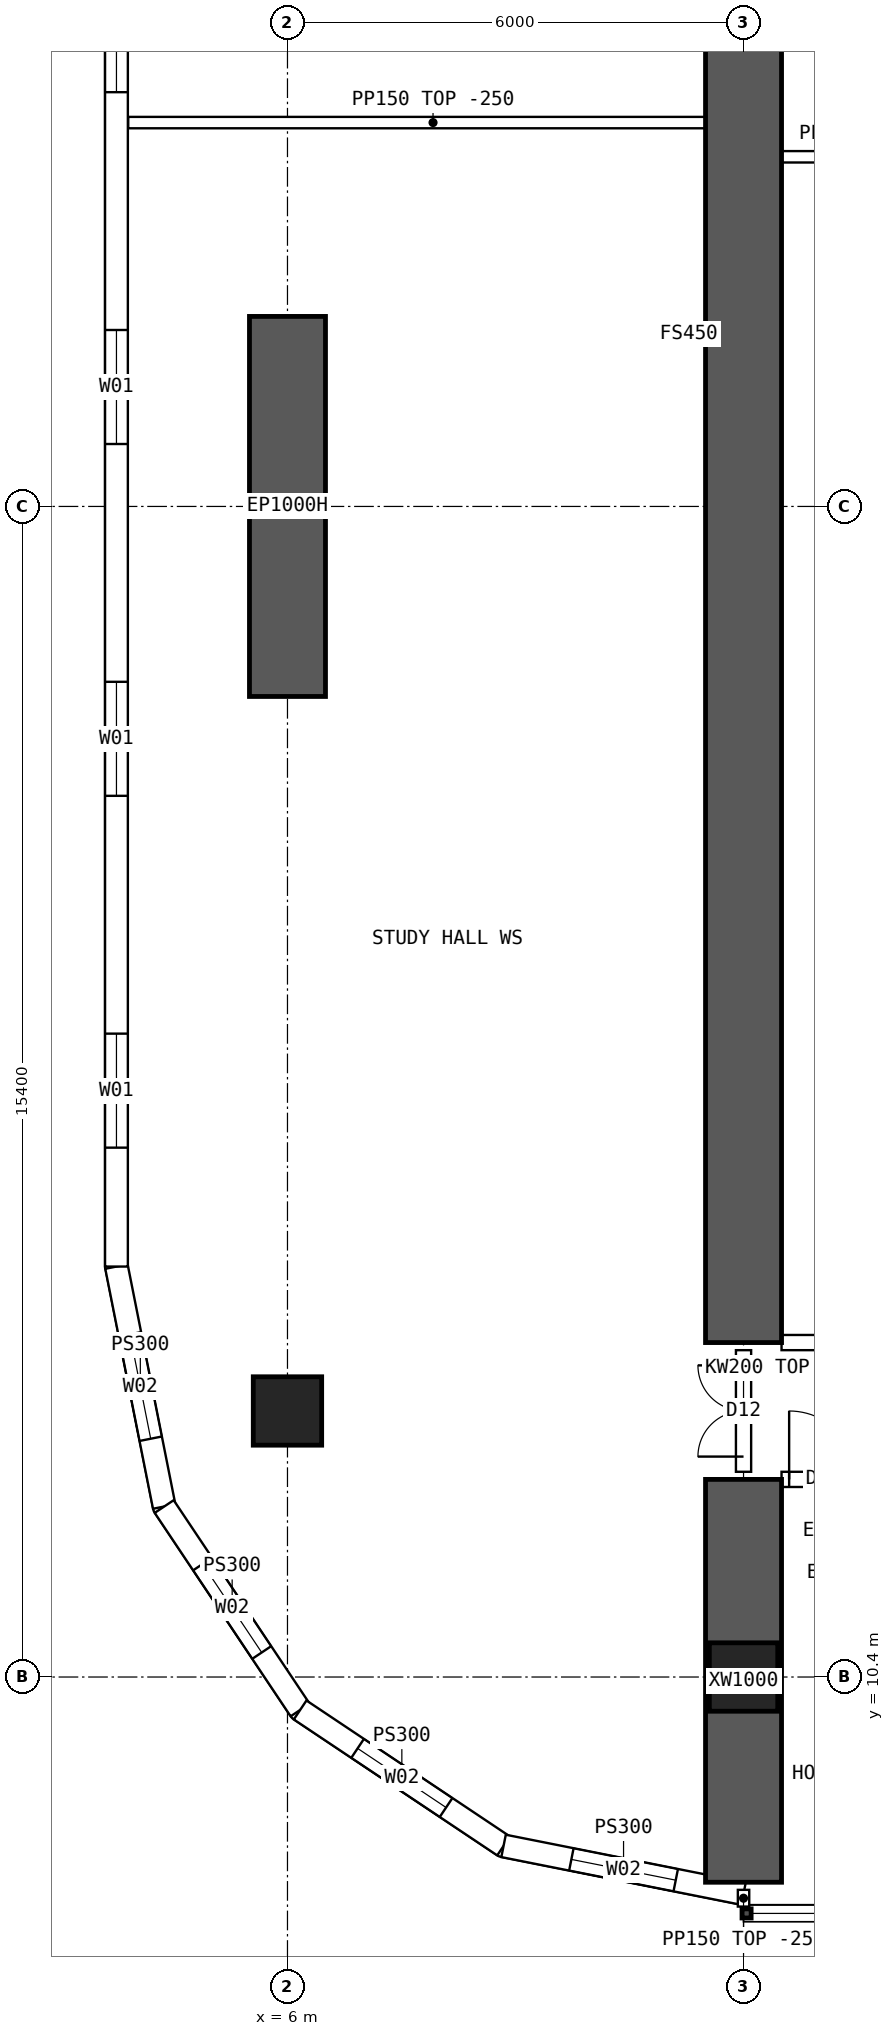
"""IFC4 building model, lengths in metres.
Left out: names, types, materials, properties, quantities, classifications, styles, units other than length and angle.
Written with IfcOpenShell. Run it as: python <this file> out.ifc"""

import sys

from ifc_helpers import new_model, si_unit, direction, frame, frame_2d, origin, origin_2d, place, context, subcontext, project, spatial, polyline, rectangle, hollow_rectangle, outline, extrude, element, fill, save


model = new_model("IFC4")
c1 = context("Model", 3, precision=1e-05, world=origin(), true_north=direction((0.0, 1.0)))
c2 = subcontext(c1, "Body", "Model", "MODEL_VIEW")
j1 = project(units=[si_unit("LENGTHUNIT", "METRE"), si_unit("PLANEANGLEUNIT", "RADIAN")], contexts=[c1])
p1 = place(None, origin())
s1 = spatial("IfcSite", under=j1, at=p1, CompositionType="ELEMENT")
p2 = place(p1, origin())
s2 = spatial("IfcBuilding", under=s1, at=p2, CompositionType="ELEMENT")
p3 = place(p2, frame((0.0, 0.0, 38.95)))
s3 = spatial("IfcBuildingStorey", under=s2, at=p3, CompositionType="ELEMENT", Elevation=38.95)
for number, where, z_axis, x_axis in (
    (1, (12.0, 10.4, 0.0), (0.0, 0.0, 1.0), (1.0, 0.0, 0.0)),
    (2, (6.0, 13.9, 0.0), (0.0, 0.0, 1.0), (1.0, 0.0, 0.0)),
):
    element("IfcColumn", number, at=place(p3, frame(where, z_axis=z_axis, x_axis=x_axis)), inside=s3, PredefinedType="COLUMN", context=c2, shape_type="SweptSolid", body=[
        extrude(hollow_rectangle(XDim=0.9, YDim=0.9, WallThickness=0.09, at=origin_2d()), origin(), (0.0, 0.0, 1.0), 3.75),
    ])
p4 = place(p3, frame((6.0, 23.3, 0.0), z_axis=(0.0, 0.0, 1.0), x_axis=(0.0, 1.0, 0.0)))
e3 = element("IfcWall", 3, at=p4, inside=s3, PredefinedType="SHEAR", context=c2, shape_type="SweptSolid", body=[
    extrude(rectangle(XDim=5.0, YDim=1.0, at=frame_2d((2.5, 0.0))), origin(), (0.0, 0.0, 1.0), 3.75),
])
p5 = place(p3, frame((12.0, 7.7, 0.0), z_axis=(0.0, 0.0, 1.0), x_axis=(0.0, 1.0, 0.0)))
e4 = element("IfcWall", 4, at=p5, inside=s3, PredefinedType="SHEAR", context=c2, shape_type="SweptSolid", body=[
    extrude(rectangle(XDim=5.3, YDim=1.0, at=frame_2d((2.65, 0.0))), origin(), (0.0, 0.0, 1.0), 3.75),
])
p6 = place(p3, frame((12.0, 14.8, 0.0), z_axis=(0.0, 0.0, 1.0), x_axis=(0.0, 1.0, 0.0)))
e5 = element("IfcWall", 5, at=p6, inside=s3, PredefinedType="SHEAR", context=c2, shape_type="SweptSolid", body=[
    extrude(rectangle(XDim=34.4, YDim=1.0, at=frame_2d((17.2, 0.0))), origin(), (0.0, 0.0, 1.0), 3.75),
])
p7 = place(p3, frame((3.75, 48.2, 0.0), z_axis=(0.0, 0.0, 1.0), x_axis=(0.0, -1.0, 0.0)))
e6 = element("IfcWall", 6, at=p7, inside=s3, PredefinedType="SOLIDWALL", context=c2, shape_type="SweptSolid", body=[
    extrude(outline(polyline([(-0.015, -0.15), (32.415, -0.15), (32.385, 0.15), (0.015, 0.15), (-0.015, -0.15)])), origin(), (0.0, 0.0, 1.0), 3.5),
])
p8 = place(p7, frame((1.564, 0.0, 0.9)))
e7 = element("IfcOpeningElement", 7, at=p8, cuts=e6, PredefinedType="OPENING", context=c2, shape_type="SweptSolid", body=[
    extrude(rectangle(XDim=1.5, YDim=2.0, at=frame_2d((0.75, 1.0))), frame((0.0, 0.16, 0.0), z_axis=(0.0, -1.0, 0.0), x_axis=(1.0, 0.0, 0.0)), (0.0, 0.0, 1.0), 0.32),
])
p9 = place(p7, frame((6.193, 0.0, 0.9)))
e8 = element("IfcOpeningElement", 8, at=p9, cuts=e6, PredefinedType="OPENING", context=c2, shape_type="SweptSolid", body=[
    extrude(rectangle(XDim=1.5, YDim=2.0, at=frame_2d((0.75, 1.0))), frame((0.0, 0.16, 0.0), z_axis=(0.0, -1.0, 0.0), x_axis=(1.0, 0.0, 0.0)), (0.0, 0.0, 1.0), 0.32),
])
p10 = place(p7, frame((10.822, 0.0, 0.9)))
e9 = element("IfcOpeningElement", 9, at=p10, cuts=e6, PredefinedType="OPENING", context=c2, shape_type="SweptSolid", body=[
    extrude(rectangle(XDim=1.5, YDim=2.0, at=frame_2d((0.75, 1.0))), frame((0.0, 0.16, 0.0), z_axis=(0.0, -1.0, 0.0), x_axis=(1.0, 0.0, 0.0)), (0.0, 0.0, 1.0), 0.32),
])
p11 = place(p7, frame((15.45, 0.0, 0.9)))
e10 = element("IfcOpeningElement", 10, at=p11, cuts=e6, PredefinedType="OPENING", context=c2, shape_type="SweptSolid", body=[
    extrude(rectangle(XDim=1.5, YDim=2.0, at=frame_2d((0.75, 1.0))), frame((0.0, 0.16, 0.0), z_axis=(0.0, -1.0, 0.0), x_axis=(1.0, 0.0, 0.0)), (0.0, 0.0, 1.0), 0.32),
])
p12 = place(p7, frame((20.079, 0.0, 0.9)))
e11 = element("IfcOpeningElement", 11, at=p12, cuts=e6, PredefinedType="OPENING", context=c2, shape_type="SweptSolid", body=[
    extrude(rectangle(XDim=1.5, YDim=2.0, at=frame_2d((0.75, 1.0))), frame((0.0, 0.16, 0.0), z_axis=(0.0, -1.0, 0.0), x_axis=(1.0, 0.0, 0.0)), (0.0, 0.0, 1.0), 0.32),
])
p13 = place(p7, frame((24.707, 0.0, 0.9)))
e12 = element("IfcOpeningElement", 12, at=p13, cuts=e6, PredefinedType="OPENING", context=c2, shape_type="SweptSolid", body=[
    extrude(rectangle(XDim=1.5, YDim=2.0, at=frame_2d((0.75, 1.0))), frame((0.0, 0.16, 0.0), z_axis=(0.0, -1.0, 0.0), x_axis=(1.0, 0.0, 0.0)), (0.0, 0.0, 1.0), 0.32),
])
p14 = place(p7, frame((29.336, 0.0, 0.9)))
e13 = element("IfcOpeningElement", 13, at=p14, cuts=e6, PredefinedType="OPENING", context=c2, shape_type="SweptSolid", body=[
    extrude(rectangle(XDim=1.5, YDim=2.0, at=frame_2d((0.75, 1.0))), frame((0.0, 0.16, 0.0), z_axis=(0.0, -1.0, 0.0), x_axis=(1.0, 0.0, 0.0)), (0.0, 0.0, 1.0), 0.32),
])
p15 = place(p3, frame((3.75, 15.8, 0.0), z_axis=(0.0, 0.0, 1.0), x_axis=(0.195065901187, -0.980790137692, 0.0)))
e14 = element("IfcWall", 14, at=p15, inside=s3, PredefinedType="SOLIDWALL", context=c2, shape_type="SweptSolid", body=[
    extrude(outline(polyline([(-0.015, -0.15), (3.249, -0.15), (3.189, 0.15), (0.015, 0.15), (-0.015, -0.15)])), origin(), (0.0, 0.0, 1.0), 3.5),
])
p16 = place(p15, frame((0.909, 0.0, 0.9)))
e15 = element("IfcOpeningElement", 15, at=p16, cuts=e14, PredefinedType="OPENING", context=c2, shape_type="SweptSolid", body=[
    extrude(rectangle(XDim=1.4, YDim=1.8, at=frame_2d((0.7, 0.9))), frame((0.0, 0.16, 0.0), z_axis=(0.0, -1.0, 0.0), x_axis=(1.0, 0.0, 0.0)), (0.0, 0.0, 1.0), 0.32),
])
p17 = place(p3, frame((4.378, 12.643, 0.0), z_axis=(0.0, 0.0, 1.0), x_axis=(0.555609954424, -0.831443069936, 0.0)))
e16 = element("IfcWall", 16, at=p17, inside=s3, PredefinedType="SOLIDWALL", context=c2, shape_type="SweptSolid", body=[
    extrude(outline(polyline([(-0.03, -0.15), (3.249, -0.15), (3.189, 0.15), (0.03, 0.15), (-0.03, -0.15)])), origin(), (0.0, 0.0, 1.0), 3.5),
])
p18 = place(p17, frame((0.909, 0.0, 0.9)))
e17 = element("IfcOpeningElement", 17, at=p18, cuts=e16, PredefinedType="OPENING", context=c2, shape_type="SweptSolid", body=[
    extrude(rectangle(XDim=1.4, YDim=1.8, at=frame_2d((0.7, 0.9))), frame((0.0, 0.16, 0.0), z_axis=(0.0, -1.0, 0.0), x_axis=(1.0, 0.0, 0.0)), (0.0, 0.0, 1.0), 0.32),
])
p19 = place(p3, frame((6.167, 9.966, 0.0), z_axis=(0.0, 0.0, 1.0), x_axis=(0.831478105043, -0.555557522525, 0.0)))
e18 = element("IfcWall", 18, at=p19, inside=s3, PredefinedType="SOLIDWALL", context=c2, shape_type="SweptSolid", body=[
    extrude(outline(polyline([(-0.03, -0.15), (3.249, -0.15), (3.189, 0.15), (0.03, 0.15), (-0.03, -0.15)])), origin(), (0.0, 0.0, 1.0), 3.5),
])
p20 = place(p19, frame((0.909, 0.0, 0.9)))
e19 = element("IfcOpeningElement", 19, at=p20, cuts=e18, PredefinedType="OPENING", context=c2, shape_type="SweptSolid", body=[
    extrude(rectangle(XDim=1.4, YDim=1.8, at=frame_2d((0.7, 0.9))), frame((0.0, 0.16, 0.0), z_axis=(0.0, -1.0, 0.0), x_axis=(1.0, 0.0, 0.0)), (0.0, 0.0, 1.0), 0.32),
])
p21 = place(p3, frame((8.843, 8.178, 0.0), z_axis=(0.0, 0.0, 1.0), x_axis=(0.980787251524, -0.195080412259, 0.0)))
e20 = element("IfcWall", 20, at=p21, inside=s3, PredefinedType="SOLIDWALL", context=c2, shape_type="SweptSolid", body=[
    extrude(outline(polyline([(-0.03, -0.15), (3.249, -0.15), (3.189, 0.15), (0.03, 0.15), (-0.03, -0.15)])), origin(), (0.0, 0.0, 1.0), 3.5),
])
p22 = place(p21, frame((0.909, 0.0, 0.9)))
e21 = element("IfcOpeningElement", 21, at=p22, cuts=e20, PredefinedType="OPENING", context=c2, shape_type="SweptSolid", body=[
    extrude(rectangle(XDim=1.4, YDim=1.8, at=frame_2d((0.7, 0.9))), frame((0.0, 0.16, 0.0), z_axis=(0.0, -1.0, 0.0), x_axis=(1.0, 0.0, 0.0)), (0.0, 0.0, 1.0), 0.32),
])
p23 = place(p3, frame((12.5, 13.0, 0.0), z_axis=(0.0, 0.0, 1.0), x_axis=(1.0, 0.0, 0.0)))
e22 = element("IfcWall", 22, at=p23, inside=s3, PredefinedType="SOLIDWALL", context=c2, shape_type="SweptSolid", body=[
    extrude(outline(polyline([(0.0, 0.0), (5.0, 0.0), (5.0, 3.1), (0.0, 3.1), (0.0, 0.0)])), frame((0.0, 0.1, 0.0), z_axis=(0.0, -1.0, 0.0), x_axis=(1.0, 0.0, 0.0)), (0.0, 0.0, 1.0), 0.2),
])
p24 = place(p23, frame((0.1, 0.0, 0.0)))
e23 = element("IfcOpeningElement", 23, at=p24, cuts=e22, PredefinedType="OPENING", context=c2, shape_type="SweptSolid", body=[
    extrude(rectangle(XDim=0.9, YDim=2.1, at=frame_2d((0.45, 1.05))), frame((0.0, 0.11, 0.0), z_axis=(0.0, -1.0, 0.0), x_axis=(1.0, 0.0, 0.0)), (0.0, 0.0, 1.0), 0.22),
])
p25 = place(p23, frame((4.0, 0.0, 0.0)))
e24 = element("IfcOpeningElement", 24, at=p25, cuts=e22, PredefinedType="OPENING", context=c2, shape_type="SweptSolid", body=[
    extrude(rectangle(XDim=0.9, YDim=2.1, at=frame_2d((0.45, 1.05))), frame((0.0, 0.11, 0.0), z_axis=(0.0, -1.0, 0.0), x_axis=(1.0, 0.0, 0.0)), (0.0, 0.0, 1.0), 0.22),
])
p26 = place(p3, frame((12.5, 14.8, 0.0), z_axis=(0.0, 0.0, 1.0), x_axis=(1.0, 0.0, 0.0)))
e25 = element("IfcWall", 25, at=p26, inside=s3, PredefinedType="SOLIDWALL", context=c2, shape_type="SweptSolid", body=[
    extrude(rectangle(XDim=5.0, YDim=0.2, at=frame_2d((2.5, 0.0))), origin(), (0.0, 0.0, 1.0), 3.5),
])
p27 = place(p26, frame((3.3, 0.0, 0.0)))
e26 = element("IfcOpeningElement", 26, at=p27, cuts=e25, PredefinedType="OPENING", context=c2, shape_type="SweptSolid", body=[
    extrude(rectangle(XDim=1.6, YDim=2.1, at=frame_2d((0.8, 1.05))), frame((0.0, 0.11, 0.0), z_axis=(0.0, -1.0, 0.0), x_axis=(1.0, 0.0, 0.0)), (0.0, 0.0, 1.0), 0.22),
])
p28 = place(p3, frame((12.0, 30.4, 0.0), z_axis=(0.0, 0.0, 1.0), x_axis=(1.0, 0.0, 0.0)))
e27 = element("IfcWall", 27, at=p28, inside=s3, PredefinedType="PARTITIONING", context=c2, shape_type="SweptSolid", body=[
    extrude(rectangle(XDim=3.6, YDim=0.15, at=frame_2d((1.8, 0.0))), origin(), (0.0, 0.0, 1.0), 3.5),
])
p29 = place(p3, frame((3.905, 30.85, 0.0), z_axis=(0.0, 0.0, 1.0), x_axis=(1.0, 0.0, 0.0)))
e28 = element("IfcWall", 28, at=p29, inside=s3, PredefinedType="PARTITIONING", context=c2, shape_type="SweptSolid", body=[
    extrude(outline(polyline([(0.0, 0.0), (8.02, 0.0), (8.02, 3.5), (2.397, 3.5), (2.395, 3.05), (1.797, 3.05), (1.795, 3.5), (0.0, 3.5), (0.0, 0.0)])), frame((0.0, 0.075, 0.0), z_axis=(0.0, -1.0, 0.0), x_axis=(1.0, 0.0, 0.0)), (0.0, 0.0, 1.0), 0.15),
])
p30 = place(p3, frame((12.0, 13.1, 0.0), z_axis=(0.0, 0.0, 1.0), x_axis=(0.0, 1.0, 0.0)))
e29 = element("IfcWall", 29, at=p30, inside=s3, PredefinedType="SOLIDWALL", context=c2, shape_type="SweptSolid", body=[
    extrude(outline(polyline([(0.0, 0.0), (1.6, 0.0), (1.6, 3.05), (0.0, 3.05), (0.0, 0.0)])), frame((0.0, 0.1, 0.0), z_axis=(0.0, -1.0, 0.0), x_axis=(1.0, 0.0, 0.0)), (0.0, 0.0, 1.0), 0.2),
])
p31 = place(p30, frame((0.2, 0.0, 0.0)))
e30 = element("IfcOpeningElement", 30, at=p31, cuts=e29, PredefinedType="OPENING", context=c2, shape_type="SweptSolid", body=[
    extrude(rectangle(XDim=1.2, YDim=2.1, at=frame_2d((0.6, 1.05))), frame((0.0, 0.11, 0.0), z_axis=(0.0, -1.0, 0.0), x_axis=(1.0, 0.0, 0.0)), (0.0, 0.0, 1.0), 0.22),
])
p32 = place(p3, frame((12.0, 7.6, 0.0), z_axis=(0.0, 0.0, 1.0), x_axis=(0.0, -1.0, 0.0)))
e31 = element("IfcWall", 31, at=p32, inside=s3, PredefinedType="PARTITIONING", context=c2, shape_type="SweptSolid", body=[
    extrude(rectangle(XDim=0.22, YDim=0.15, at=frame_2d((0.11, 0.0))), origin(), (0.0, 0.0, 1.0), 3.5),
])
p33 = place(p11, origin())
e32 = element("IfcWindow", 32, at=p33, inside=s3, PartitioningType="SINGLE_PANEL", PredefinedType="WINDOW", context=c2, shape_type="SweptSolid", body=[
    extrude(rectangle(XDim=1.5, YDim=2.0, at=frame_2d((0.75, 1.0))), frame((0.0, 0.03, 0.0), z_axis=(0.0, -1.0, 0.0), x_axis=(1.0, 0.0, 0.0)), (0.0, 0.0, 1.0), 0.06),
])
fill(e10, e32)
p34 = place(p12, origin())
e33 = element("IfcWindow", 33, at=p34, inside=s3, PartitioningType="SINGLE_PANEL", PredefinedType="WINDOW", context=c2, shape_type="SweptSolid", body=[
    extrude(rectangle(XDim=1.5, YDim=2.0, at=frame_2d((0.75, 1.0))), frame((0.0, 0.03, 0.0), z_axis=(0.0, -1.0, 0.0), x_axis=(1.0, 0.0, 0.0)), (0.0, 0.0, 1.0), 0.06),
])
fill(e11, e33)
p35 = place(p13, origin())
e34 = element("IfcWindow", 34, at=p35, inside=s3, PartitioningType="SINGLE_PANEL", PredefinedType="WINDOW", context=c2, shape_type="SweptSolid", body=[
    extrude(rectangle(XDim=1.5, YDim=2.0, at=frame_2d((0.75, 1.0))), frame((0.0, 0.03, 0.0), z_axis=(0.0, -1.0, 0.0), x_axis=(1.0, 0.0, 0.0)), (0.0, 0.0, 1.0), 0.06),
])
fill(e12, e34)
p36 = place(p14, origin())
e35 = element("IfcWindow", 35, at=p36, inside=s3, PartitioningType="SINGLE_PANEL", PredefinedType="WINDOW", context=c2, shape_type="SweptSolid", body=[
    extrude(rectangle(XDim=1.5, YDim=2.0, at=frame_2d((0.75, 1.0))), frame((0.0, 0.03, 0.0), z_axis=(0.0, -1.0, 0.0), x_axis=(1.0, 0.0, 0.0)), (0.0, 0.0, 1.0), 0.06),
])
fill(e13, e35)
p37 = place(p16, origin())
e36 = element("IfcWindow", 36, at=p37, inside=s3, PartitioningType="SINGLE_PANEL", PredefinedType="WINDOW", context=c2, shape_type="SweptSolid", body=[
    extrude(rectangle(XDim=1.4, YDim=1.8, at=frame_2d((0.7, 0.9))), frame((0.0, 0.03, 0.0), z_axis=(0.0, -1.0, 0.0), x_axis=(1.0, 0.0, 0.0)), (0.0, 0.0, 1.0), 0.06),
])
fill(e15, e36)
p38 = place(p18, origin())
e37 = element("IfcWindow", 37, at=p38, inside=s3, PartitioningType="SINGLE_PANEL", PredefinedType="WINDOW", context=c2, shape_type="SweptSolid", body=[
    extrude(rectangle(XDim=1.4, YDim=1.8, at=frame_2d((0.7, 0.9))), frame((0.0, 0.03, 0.0), z_axis=(0.0, -1.0, 0.0), x_axis=(1.0, 0.0, 0.0)), (0.0, 0.0, 1.0), 0.06),
])
fill(e17, e37)
p39 = place(p20, origin())
e38 = element("IfcWindow", 38, at=p39, inside=s3, PartitioningType="SINGLE_PANEL", PredefinedType="WINDOW", context=c2, shape_type="SweptSolid", body=[
    extrude(rectangle(XDim=1.4, YDim=1.8, at=frame_2d((0.7, 0.9))), frame((0.0, 0.03, 0.0), z_axis=(0.0, -1.0, 0.0), x_axis=(1.0, 0.0, 0.0)), (0.0, 0.0, 1.0), 0.06),
])
fill(e19, e38)
p40 = place(p22, origin())
e39 = element("IfcWindow", 39, at=p40, inside=s3, PartitioningType="SINGLE_PANEL", PredefinedType="WINDOW", context=c2, shape_type="SweptSolid", body=[
    extrude(rectangle(XDim=1.4, YDim=1.8, at=frame_2d((0.7, 0.9))), frame((0.0, 0.03, 0.0), z_axis=(0.0, -1.0, 0.0), x_axis=(1.0, 0.0, 0.0)), (0.0, 0.0, 1.0), 0.06),
])
fill(e21, e39)
p41 = place(p24, origin())
e40 = element("IfcDoor", 40, at=p41, inside=s3, OperationType="SINGLE_SWING_LEFT", PredefinedType="DOOR", context=c2, shape_type="SweptSolid", body=[
    extrude(rectangle(XDim=0.9, YDim=2.1, at=frame_2d((0.45, 1.05))), frame((0.0, 0.025, 0.0), z_axis=(0.0, -1.0, 0.0), x_axis=(1.0, 0.0, 0.0)), (0.0, 0.0, 1.0), 0.05),
])
fill(e23, e40)
p42 = place(p31, origin())
e41 = element("IfcDoor", 41, at=p42, inside=s3, OperationType="DOUBLE_DOOR_SINGLE_SWING", PredefinedType="DOOR", context=c2, shape_type="SweptSolid", body=[
    extrude(rectangle(XDim=1.2, YDim=2.1, at=frame_2d((0.6, 1.05))), frame((0.0, 0.025, 0.0), z_axis=(0.0, -1.0, 0.0), x_axis=(1.0, 0.0, 0.0)), (0.0, 0.0, 1.0), 0.05),
])
fill(e30, e41)
save(model, sys.argv[1])
